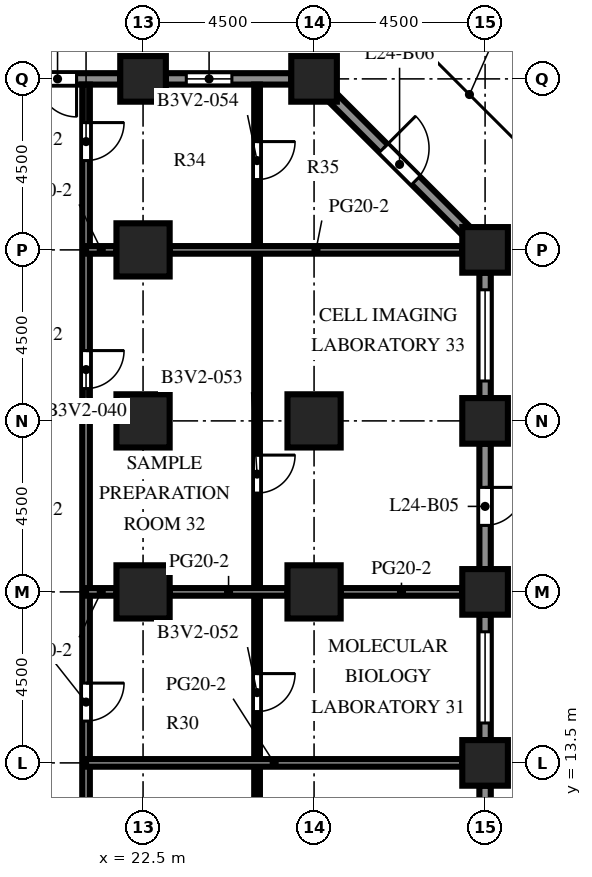
"""IFC4 building model, lengths in metres.
Left out: names, types, materials, properties, quantities, classifications, styles, units other than length and angle.
Written with IfcOpenShell. Run it as: python <this file> out.ifc"""

import sys

from ifc_helpers import new_model, si_unit, direction, frame, frame_2d, origin, origin_2d, place, context, subcontext, project, spatial, rectangle, extrude, element, fill, save


model = new_model("IFC4")
c1 = context("Model", 3, precision=1e-05, world=origin(), true_north=direction((0.0, 1.0)))
c2 = subcontext(c1, "Body", "Model", "MODEL_VIEW")
j1 = project(units=[si_unit("LENGTHUNIT", "METRE"), si_unit("PLANEANGLEUNIT", "RADIAN")], contexts=[c1])
p1 = place(None, origin())
s1 = spatial("IfcSite", under=j1, at=p1, CompositionType="ELEMENT")
p2 = place(p1, origin())
s2 = spatial("IfcBuilding", under=s1, at=p2, CompositionType="ELEMENT")
p3 = place(p2, frame((0.0, 0.0, 106.6)))
s3 = spatial("IfcBuildingStorey", under=s2, at=p3, CompositionType="ELEMENT", Elevation=106.6)
for number, where, z_axis, x_axis in (
    (1, (22.5, 31.5, 0.0), (0.0, 0.0, 1.0), (1.0, 0.0, 0.0)),
    (2, (27.0, 31.5, 0.0), (0.0, 0.0, 1.0), (1.0, 0.0, 0.0)),
    (3, (31.5, 13.5, 0.0), (0.0, 0.0, 1.0), (1.0, 0.0, 0.0)),
    (4, (31.5, 18.0, 0.0), (0.0, 0.0, 1.0), (1.0, 0.0, 0.0)),
    (5, (31.5, 22.5, 0.0), (0.0, 0.0, 1.0), (1.0, 0.0, 0.0)),
    (6, (31.5, 27.0, 0.0), (0.0, 0.0, 1.0), (1.0, 0.0, 0.0)),
):
    element("IfcColumn", number, at=place(p3, frame(where, z_axis=z_axis, x_axis=x_axis)), inside=s3, PredefinedType="COLUMN", context=c2, shape_type="SweptSolid", body=[
        extrude(rectangle(XDim=1.2, YDim=1.2, at=origin_2d()), origin(), (0.0, 0.0, 1.0), 4.1),
    ])
for number, where, z_axis, x_axis in (
    (7, (22.5, 18.0, 0.0), (0.0, 0.0, 1.0), (1.0, 0.0, 0.0)),
    (8, (22.5, 22.5, 0.0), (0.0, 0.0, 1.0), (1.0, 0.0, 0.0)),
    (9, (22.5, 27.0, 0.0), (0.0, 0.0, 1.0), (1.0, 0.0, 0.0)),
    (10, (27.0, 18.0, 0.0), (0.0, 0.0, 1.0), (1.0, 0.0, 0.0)),
    (11, (27.0, 22.5, 0.0), (0.0, 0.0, 1.0), (1.0, 0.0, 0.0)),
):
    element("IfcColumn", number, at=place(p3, frame(where, z_axis=z_axis, x_axis=x_axis)), inside=s3, PredefinedType="COLUMN", context=c2, shape_type="SweptSolid", body=[
        extrude(rectangle(XDim=1.4, YDim=1.4, at=origin_2d()), origin(), (0.0, 0.0, 1.0), 4.1),
    ])
p4 = place(p3, frame((31.5, 12.9, 0.0), z_axis=(0.0, 0.0, 1.0), x_axis=(0.0, -1.0, 0.0)))
e12 = element("IfcWall", 12, at=p4, inside=s3, PredefinedType="SOLIDWALL", context=c2, shape_type="SweptSolid", body=[
    extrude(rectangle(XDim=3.3, YDim=0.3, at=frame_2d((1.65, 0.0))), origin(), (0.0, 0.0, 1.0), 2.6),
])
p5 = place(p4, frame((0.45, 0.0, 0.8)))
e13 = element("IfcOpeningElement", 13, at=p5, cuts=e12, PredefinedType="OPENING", context=c2, shape_type="SweptSolid", body=[
    extrude(rectangle(XDim=2.4, YDim=1.7, at=frame_2d((1.2, 0.85))), frame((0.0, 0.16, 0.0), z_axis=(0.0, -1.0, 0.0), x_axis=(1.0, 0.0, 0.0)), (0.0, 0.0, 1.0), 0.32),
])
p6 = place(p3, frame((31.5, 17.4, 0.0), z_axis=(0.0, 0.0, 1.0), x_axis=(0.0, -1.0, 0.0)))
e14 = element("IfcWall", 14, at=p6, inside=s3, PredefinedType="SOLIDWALL", context=c2, shape_type="SweptSolid", body=[
    extrude(rectangle(XDim=3.3, YDim=0.3, at=frame_2d((1.65, 0.0))), origin(), (0.0, 0.0, 1.0), 2.6),
])
p7 = place(p6, frame((0.45, 0.0, 0.8)))
e15 = element("IfcOpeningElement", 15, at=p7, cuts=e14, PredefinedType="OPENING", context=c2, shape_type="SweptSolid", body=[
    extrude(rectangle(XDim=2.4, YDim=1.7, at=frame_2d((1.2, 0.85))), frame((0.0, 0.16, 0.0), z_axis=(0.0, -1.0, 0.0), x_axis=(1.0, 0.0, 0.0)), (0.0, 0.0, 1.0), 0.32),
])
p8 = place(p3, frame((31.5, 21.9, 0.0), z_axis=(0.0, 0.0, 1.0), x_axis=(0.0, -1.0, 0.0)))
e16 = element("IfcWall", 16, at=p8, inside=s3, PredefinedType="SOLIDWALL", context=c2, shape_type="SweptSolid", body=[
    extrude(rectangle(XDim=3.3, YDim=0.3, at=frame_2d((1.65, 0.0))), origin(), (0.0, 0.0, 1.0), 2.6),
])
p9 = place(p8, frame((1.15, 0.0, 0.0)))
e17 = element("IfcOpeningElement", 17, at=p9, cuts=e16, PredefinedType="OPENING", context=c2, shape_type="SweptSolid", body=[
    extrude(rectangle(XDim=1.0, YDim=2.2, at=frame_2d((0.5, 1.1))), frame((0.0, 0.16, 0.0), z_axis=(0.0, -1.0, 0.0), x_axis=(1.0, 0.0, 0.0)), (0.0, 0.0, 1.0), 0.32),
])
p10 = place(p3, frame((31.5, 26.4, 0.0), z_axis=(0.0, 0.0, 1.0), x_axis=(0.0, -1.0, 0.0)))
e18 = element("IfcWall", 18, at=p10, inside=s3, PredefinedType="SOLIDWALL", context=c2, shape_type="SweptSolid", body=[
    extrude(rectangle(XDim=3.3, YDim=0.3, at=frame_2d((1.65, 0.0))), origin(), (0.0, 0.0, 1.0), 2.6),
])
p11 = place(p10, frame((0.45, 0.0, 0.8)))
e19 = element("IfcOpeningElement", 19, at=p11, cuts=e18, PredefinedType="OPENING", context=c2, shape_type="SweptSolid", body=[
    extrude(rectangle(XDim=2.4, YDim=1.7, at=frame_2d((1.2, 0.85))), frame((0.0, 0.16, 0.0), z_axis=(0.0, -1.0, 0.0), x_axis=(1.0, 0.0, 0.0)), (0.0, 0.0, 1.0), 0.32),
])
p12 = place(p3, frame((27.494, 31.006, 0.0), z_axis=(0.0, 0.0, 1.0), x_axis=(0.707106781187, -0.707106781187, 0.0)))
e20 = element("IfcWall", 20, at=p12, inside=s3, PredefinedType="SOLIDWALL", context=c2, shape_type="SweptSolid", body=[
    extrude(rectangle(XDim=4.967, YDim=0.3, at=frame_2d((2.483, 0.0))), origin(), (0.0, 0.0, 1.0), 2.6),
])
p13 = place(p12, frame((1.884, 0.0, 0.0)))
e21 = element("IfcOpeningElement", 21, at=p13, cuts=e20, PredefinedType="OPENING", context=c2, shape_type="SweptSolid", body=[
    extrude(rectangle(XDim=1.2, YDim=2.2, at=frame_2d((0.6, 1.1))), frame((0.0, 0.16, 0.0), z_axis=(0.0, -1.0, 0.0), x_axis=(1.0, 0.0, 0.0)), (0.0, 0.0, 1.0), 0.32),
])
p14 = place(p3, frame((23.1, 31.5, 0.0), z_axis=(0.0, 0.0, 1.0), x_axis=(1.0, 0.0, 0.0)))
e22 = element("IfcWall", 22, at=p14, inside=s3, PredefinedType="SOLIDWALL", context=c2, shape_type="SweptSolid", body=[
    extrude(rectangle(XDim=3.3, YDim=0.3, at=frame_2d((1.65, 0.0))), origin(), (0.0, 0.0, 1.0), 2.6),
])
p15 = place(p14, frame((0.538, 0.0, 0.8)))
e23 = element("IfcOpeningElement", 23, at=p15, cuts=e22, PredefinedType="OPENING", context=c2, shape_type="SweptSolid", body=[
    extrude(rectangle(XDim=1.2, YDim=1.7, at=frame_2d((0.6, 0.85))), frame((0.0, 0.16, 0.0), z_axis=(0.0, -1.0, 0.0), x_axis=(1.0, 0.0, 0.0)), (0.0, 0.0, 1.0), 0.32),
])
p16 = place(p3, frame((18.6, 31.5, 0.0), z_axis=(0.0, 0.0, 1.0), x_axis=(1.0, 0.0, 0.0)))
e24 = element("IfcWall", 24, at=p16, inside=s3, PredefinedType="SOLIDWALL", context=c2, shape_type="SweptSolid", body=[
    extrude(rectangle(XDim=3.3, YDim=0.3, at=frame_2d((1.65, 0.0))), origin(), (0.0, 0.0, 1.0), 2.6),
])
p17 = place(p16, frame((1.15, 0.0, 0.0)))
e25 = element("IfcOpeningElement", 25, at=p17, cuts=e24, PredefinedType="OPENING", context=c2, shape_type="SweptSolid", body=[
    extrude(rectangle(XDim=1.0, YDim=2.2, at=frame_2d((0.5, 1.1))), frame((0.0, 0.16, 0.0), z_axis=(0.0, -1.0, 0.0), x_axis=(1.0, 0.0, 0.0)), (0.0, 0.0, 1.0), 0.32),
])
p18 = place(p3, frame((21.0, 31.35, 0.0), z_axis=(0.0, 0.0, 1.0), x_axis=(0.0, -1.0, 0.0)))
e26 = element("IfcWall", 26, at=p18, inside=s3, PredefinedType="PARTITIONING", context=c2, shape_type="SweptSolid", body=[
    extrude(rectangle(XDim=53.7, YDim=0.2, at=frame_2d((26.85, 0.0))), origin(), (0.0, 0.0, 1.0), 3.5),
])
p19 = place(p18, frame((50.5, 0.0, 0.0)))
e27 = element("IfcOpeningElement", 27, at=p19, cuts=e26, PredefinedType="OPENING", context=c2, shape_type="SweptSolid", body=[
    extrude(rectangle(XDim=1.0, YDim=2.1, at=frame_2d((0.5, 1.05))), frame((0.0, 0.11, 0.0), z_axis=(0.0, -1.0, 0.0), x_axis=(1.0, 0.0, 0.0)), (0.0, 0.0, 1.0), 0.22),
])
p20 = place(p18, frame((46.5, 0.0, 0.0)))
e28 = element("IfcOpeningElement", 28, at=p20, cuts=e26, PredefinedType="OPENING", context=c2, shape_type="SweptSolid", body=[
    extrude(rectangle(XDim=1.0, YDim=2.1, at=frame_2d((0.5, 1.05))), frame((0.0, 0.11, 0.0), z_axis=(0.0, -1.0, 0.0), x_axis=(1.0, 0.0, 0.0)), (0.0, 0.0, 1.0), 0.22),
])
p21 = place(p18, frame((38.5, 0.0, 0.0)))
e29 = element("IfcOpeningElement", 29, at=p21, cuts=e26, PredefinedType="OPENING", context=c2, shape_type="SweptSolid", body=[
    extrude(rectangle(XDim=1.0, YDim=2.1, at=frame_2d((0.5, 1.05))), frame((0.0, 0.11, 0.0), z_axis=(0.0, -1.0, 0.0), x_axis=(1.0, 0.0, 0.0)), (0.0, 0.0, 1.0), 0.22),
])
p22 = place(p18, frame((33.0, 0.0, 0.0)))
e30 = element("IfcOpeningElement", 30, at=p22, cuts=e26, PredefinedType="OPENING", context=c2, shape_type="SweptSolid", body=[
    extrude(rectangle(XDim=1.0, YDim=2.1, at=frame_2d((0.5, 1.05))), frame((0.0, 0.11, 0.0), z_axis=(0.0, -1.0, 0.0), x_axis=(1.0, 0.0, 0.0)), (0.0, 0.0, 1.0), 0.22),
])
p23 = place(p18, frame((23.5, 0.0, 0.0)))
e31 = element("IfcOpeningElement", 31, at=p23, cuts=e26, PredefinedType="OPENING", context=c2, shape_type="SweptSolid", body=[
    extrude(rectangle(XDim=1.0, YDim=2.1, at=frame_2d((0.5, 1.05))), frame((0.0, 0.11, 0.0), z_axis=(0.0, -1.0, 0.0), x_axis=(1.0, 0.0, 0.0)), (0.0, 0.0, 1.0), 0.22),
])
p24 = place(p18, frame((15.75, 0.0, 0.0)))
e32 = element("IfcOpeningElement", 32, at=p24, cuts=e26, PredefinedType="OPENING", context=c2, shape_type="SweptSolid", body=[
    extrude(rectangle(XDim=1.0, YDim=2.1, at=frame_2d((0.5, 1.05))), frame((0.0, 0.11, 0.0), z_axis=(0.0, -1.0, 0.0), x_axis=(1.0, 0.0, 0.0)), (0.0, 0.0, 1.0), 0.22),
])
p25 = place(p18, frame((7.0, 0.0, 0.0)))
e33 = element("IfcOpeningElement", 33, at=p25, cuts=e26, PredefinedType="OPENING", context=c2, shape_type="SweptSolid", body=[
    extrude(rectangle(XDim=1.0, YDim=2.1, at=frame_2d((0.5, 1.05))), frame((0.0, 0.11, 0.0), z_axis=(0.0, -1.0, 0.0), x_axis=(1.0, 0.0, 0.0)), (0.0, 0.0, 1.0), 0.22),
])
p26 = place(p18, frame((1.0, 0.0, 0.0)))
e34 = element("IfcOpeningElement", 34, at=p26, cuts=e26, PredefinedType="OPENING", context=c2, shape_type="SweptSolid", body=[
    extrude(rectangle(XDim=1.0, YDim=2.1, at=frame_2d((0.5, 1.05))), frame((0.0, 0.11, 0.0), z_axis=(0.0, -1.0, 0.0), x_axis=(1.0, 0.0, 0.0)), (0.0, 0.0, 1.0), 0.22),
])
p27 = place(p3, frame((25.5, 31.35, 0.0), z_axis=(0.0, 0.0, 1.0), x_axis=(0.0, -1.0, 0.0)))
e35 = element("IfcWall", 35, at=p27, inside=s3, PredefinedType="PARTITIONING", context=c2, shape_type="SweptSolid", body=[
    extrude(rectangle(XDim=53.7, YDim=0.15, at=frame_2d((26.85, 0.0))), origin(), (0.0, 0.0, 1.0), 3.5),
])
p28 = place(p27, frame((50.5, 0.0, 0.0)))
e36 = element("IfcOpeningElement", 36, at=p28, cuts=e35, PredefinedType="OPENING", context=c2, shape_type="SweptSolid", body=[
    extrude(rectangle(XDim=1.0, YDim=2.1, at=frame_2d((0.5, 1.05))), frame((0.0, 0.085, 0.0), z_axis=(0.0, -1.0, 0.0), x_axis=(1.0, 0.0, 0.0)), (0.0, 0.0, 1.0), 0.17),
])
p29 = place(p27, frame((46.25, 0.0, 0.0)))
e37 = element("IfcOpeningElement", 37, at=p29, cuts=e35, PredefinedType="OPENING", context=c2, shape_type="SweptSolid", body=[
    extrude(rectangle(XDim=1.0, YDim=2.1, at=frame_2d((0.5, 1.05))), frame((0.0, 0.085, 0.0), z_axis=(0.0, -1.0, 0.0), x_axis=(1.0, 0.0, 0.0)), (0.0, 0.0, 1.0), 0.17),
])
p30 = place(p27, frame((38.5, 0.0, 0.0)))
e38 = element("IfcOpeningElement", 38, at=p30, cuts=e35, PredefinedType="OPENING", context=c2, shape_type="SweptSolid", body=[
    extrude(rectangle(XDim=1.0, YDim=2.1, at=frame_2d((0.5, 1.05))), frame((0.0, 0.085, 0.0), z_axis=(0.0, -1.0, 0.0), x_axis=(1.0, 0.0, 0.0)), (0.0, 0.0, 1.0), 0.17),
])
p31 = place(p27, frame((33.0, 0.0, 0.0)))
e39 = element("IfcOpeningElement", 39, at=p31, cuts=e35, PredefinedType="OPENING", context=c2, shape_type="SweptSolid", body=[
    extrude(rectangle(XDim=1.0, YDim=2.1, at=frame_2d((0.5, 1.05))), frame((0.0, 0.085, 0.0), z_axis=(0.0, -1.0, 0.0), x_axis=(1.0, 0.0, 0.0)), (0.0, 0.0, 1.0), 0.17),
])
p32 = place(p27, frame((24.75, 0.0, 0.0)))
e40 = element("IfcOpeningElement", 40, at=p32, cuts=e35, PredefinedType="OPENING", context=c2, shape_type="SweptSolid", body=[
    extrude(rectangle(XDim=1.0, YDim=2.1, at=frame_2d((0.5, 1.05))), frame((0.0, 0.085, 0.0), z_axis=(0.0, -1.0, 0.0), x_axis=(1.0, 0.0, 0.0)), (0.0, 0.0, 1.0), 0.17),
])
p33 = place(p27, frame((15.5, 0.0, 0.0)))
e41 = element("IfcOpeningElement", 41, at=p33, cuts=e35, PredefinedType="OPENING", context=c2, shape_type="SweptSolid", body=[
    extrude(rectangle(XDim=1.0, YDim=2.1, at=frame_2d((0.5, 1.05))), frame((0.0, 0.085, 0.0), z_axis=(0.0, -1.0, 0.0), x_axis=(1.0, 0.0, 0.0)), (0.0, 0.0, 1.0), 0.17),
])
p34 = place(p27, frame((9.75, 0.0, 0.0)))
e42 = element("IfcOpeningElement", 42, at=p34, cuts=e35, PredefinedType="OPENING", context=c2, shape_type="SweptSolid", body=[
    extrude(rectangle(XDim=1.0, YDim=2.1, at=frame_2d((0.5, 1.05))), frame((0.0, 0.085, 0.0), z_axis=(0.0, -1.0, 0.0), x_axis=(1.0, 0.0, 0.0)), (0.0, 0.0, 1.0), 0.17),
])
p35 = place(p27, frame((1.5, 0.0, 0.0)))
e43 = element("IfcOpeningElement", 43, at=p35, cuts=e35, PredefinedType="OPENING", context=c2, shape_type="SweptSolid", body=[
    extrude(rectangle(XDim=1.0, YDim=2.1, at=frame_2d((0.5, 1.05))), frame((0.0, 0.085, 0.0), z_axis=(0.0, -1.0, 0.0), x_axis=(1.0, 0.0, 0.0)), (0.0, 0.0, 1.0), 0.17),
])
p36 = place(p3, frame((21.0, 13.5, 0.0), z_axis=(0.0, 0.0, 1.0), x_axis=(1.0, 0.0, 0.0)))
e44 = element("IfcWall", 44, at=p36, inside=s3, PredefinedType="PARTITIONING", context=c2, shape_type="SweptSolid", body=[
    extrude(rectangle(XDim=9.9, YDim=0.2, at=frame_2d((4.95, 0.0))), origin(), (0.0, 0.0, 1.0), 3.5),
])
p37 = place(p3, frame((21.0, 18.0, 0.0), z_axis=(0.0, 0.0, 1.0), x_axis=(1.0, 0.0, 0.0)))
e45 = element("IfcWall", 45, at=p37, inside=s3, PredefinedType="PARTITIONING", context=c2, shape_type="SweptSolid", body=[
    extrude(rectangle(XDim=0.8, YDim=0.2, at=frame_2d((0.4, 0.0))), origin(), (0.0, 0.0, 1.0), 3.5),
])
p38 = place(p3, frame((23.2, 18.0, 0.0), z_axis=(0.0, 0.0, 1.0), x_axis=(1.0, 0.0, 0.0)))
e46 = element("IfcWall", 46, at=p38, inside=s3, PredefinedType="PARTITIONING", context=c2, shape_type="SweptSolid", body=[
    extrude(rectangle(XDim=3.1, YDim=0.2, at=frame_2d((1.55, 0.0))), origin(), (0.0, 0.0, 1.0), 3.5),
])
p39 = place(p3, frame((27.7, 18.0, 0.0), z_axis=(0.0, 0.0, 1.0), x_axis=(1.0, 0.0, 0.0)))
e47 = element("IfcWall", 47, at=p39, inside=s3, PredefinedType="PARTITIONING", context=c2, shape_type="SweptSolid", body=[
    extrude(rectangle(XDim=3.2, YDim=0.2, at=frame_2d((1.6, 0.0))), origin(), (0.0, 0.0, 1.0), 3.5),
])
p40 = place(p3, frame((21.0, 27.0, 0.0), z_axis=(0.0, 0.0, 1.0), x_axis=(1.0, 0.0, 0.0)))
e48 = element("IfcWall", 48, at=p40, inside=s3, PredefinedType="PARTITIONING", context=c2, shape_type="SweptSolid", body=[
    extrude(rectangle(XDim=0.8, YDim=0.2, at=frame_2d((0.4, 0.0))), origin(), (0.0, 0.0, 1.0), 3.5),
])
p41 = place(p3, frame((23.2, 27.0, 0.0), z_axis=(0.0, 0.0, 1.0), x_axis=(1.0, 0.0, 0.0)))
e49 = element("IfcWall", 49, at=p41, inside=s3, PredefinedType="PARTITIONING", context=c2, shape_type="SweptSolid", body=[
    extrude(rectangle(XDim=7.7, YDim=0.2, at=frame_2d((3.85, 0.0))), origin(), (0.0, 0.0, 1.0), 3.5),
])
p42 = place(p7, origin())
e50 = element("IfcWindow", 50, at=p42, inside=s3, PartitioningType="SINGLE_PANEL", PredefinedType="WINDOW", context=c2, shape_type="SweptSolid", body=[
    extrude(rectangle(XDim=2.4, YDim=1.7, at=frame_2d((1.2, 0.85))), frame((0.0, 0.03, 0.0), z_axis=(0.0, -1.0, 0.0), x_axis=(1.0, 0.0, 0.0)), (0.0, 0.0, 1.0), 0.06),
])
fill(e15, e50)
p43 = place(p9, origin())
e51 = element("IfcDoor", 51, at=p43, inside=s3, OperationType="SINGLE_SWING_LEFT", PredefinedType="DOOR", context=c2, shape_type="SweptSolid", body=[
    extrude(rectangle(XDim=1.0, YDim=2.2, at=frame_2d((0.5, 1.1))), frame((0.0, 0.025, 0.0), z_axis=(0.0, -1.0, 0.0), x_axis=(1.0, 0.0, 0.0)), (0.0, 0.0, 1.0), 0.05),
])
fill(e17, e51)
p44 = place(p11, origin())
e52 = element("IfcWindow", 52, at=p44, inside=s3, PartitioningType="SINGLE_PANEL", PredefinedType="WINDOW", context=c2, shape_type="SweptSolid", body=[
    extrude(rectangle(XDim=2.4, YDim=1.7, at=frame_2d((1.2, 0.85))), frame((0.0, 0.03, 0.0), z_axis=(0.0, -1.0, 0.0), x_axis=(1.0, 0.0, 0.0)), (0.0, 0.0, 1.0), 0.06),
])
fill(e19, e52)
p45 = place(p13, origin())
e53 = element("IfcDoor", 53, at=p45, inside=s3, OperationType="SINGLE_SWING_LEFT", PredefinedType="DOOR", context=c2, shape_type="SweptSolid", body=[
    extrude(rectangle(XDim=1.2, YDim=2.2, at=frame_2d((0.6, 1.1))), frame((0.0, 0.025, 0.0), z_axis=(0.0, -1.0, 0.0), x_axis=(1.0, 0.0, 0.0)), (0.0, 0.0, 1.0), 0.05),
])
fill(e21, e53)
p46 = place(p15, origin())
e54 = element("IfcWindow", 54, at=p46, inside=s3, PartitioningType="SINGLE_PANEL", PredefinedType="WINDOW", context=c2, shape_type="SweptSolid", body=[
    extrude(rectangle(XDim=1.2, YDim=1.7, at=frame_2d((0.6, 0.85))), frame((0.0, 0.03, 0.0), z_axis=(0.0, -1.0, 0.0), x_axis=(1.0, 0.0, 0.0)), (0.0, 0.0, 1.0), 0.06),
])
fill(e23, e54)
p47 = place(p17, origin())
e55 = element("IfcDoor", 55, at=p47, inside=s3, OperationType="SINGLE_SWING_RIGHT", PredefinedType="DOOR", context=c2, shape_type="SweptSolid", body=[
    extrude(rectangle(XDim=1.0, YDim=2.2, at=frame_2d((0.5, 1.1))), frame((0.0, 0.025, 0.0), z_axis=(0.0, -1.0, 0.0), x_axis=(1.0, 0.0, 0.0)), (0.0, 0.0, 1.0), 0.05),
])
fill(e25, e55)
p48 = place(p24, origin())
e56 = element("IfcDoor", 56, at=p48, inside=s3, OperationType="SINGLE_SWING_LEFT", PredefinedType="DOOR", context=c2, shape_type="SweptSolid", body=[
    extrude(rectangle(XDim=1.0, YDim=2.1, at=frame_2d((0.5, 1.05))), frame((0.0, 0.025, 0.0), z_axis=(0.0, -1.0, 0.0), x_axis=(1.0, 0.0, 0.0)), (0.0, 0.0, 1.0), 0.05),
])
fill(e32, e56)
p49 = place(p25, origin())
e57 = element("IfcDoor", 57, at=p49, inside=s3, OperationType="SINGLE_SWING_LEFT", PredefinedType="DOOR", context=c2, shape_type="SweptSolid", body=[
    extrude(rectangle(XDim=1.0, YDim=2.1, at=frame_2d((0.5, 1.05))), frame((0.0, 0.025, 0.0), z_axis=(0.0, -1.0, 0.0), x_axis=(1.0, 0.0, 0.0)), (0.0, 0.0, 1.0), 0.05),
])
fill(e33, e57)
p50 = place(p26, origin())
e58 = element("IfcDoor", 58, at=p50, inside=s3, OperationType="SINGLE_SWING_LEFT", PredefinedType="DOOR", context=c2, shape_type="SweptSolid", body=[
    extrude(rectangle(XDim=1.0, YDim=2.1, at=frame_2d((0.5, 1.05))), frame((0.0, 0.025, 0.0), z_axis=(0.0, -1.0, 0.0), x_axis=(1.0, 0.0, 0.0)), (0.0, 0.0, 1.0), 0.05),
])
fill(e34, e58)
p51 = place(p33, origin())
e59 = element("IfcDoor", 59, at=p51, inside=s3, OperationType="SINGLE_SWING_LEFT", PredefinedType="DOOR", context=c2, shape_type="SweptSolid", body=[
    extrude(rectangle(XDim=1.0, YDim=2.1, at=frame_2d((0.5, 1.05))), frame((0.0, 0.025, 0.0), z_axis=(0.0, -1.0, 0.0), x_axis=(1.0, 0.0, 0.0)), (0.0, 0.0, 1.0), 0.05),
])
fill(e41, e59)
p52 = place(p34, origin())
e60 = element("IfcDoor", 60, at=p52, inside=s3, OperationType="SINGLE_SWING_LEFT", PredefinedType="DOOR", context=c2, shape_type="SweptSolid", body=[
    extrude(rectangle(XDim=1.0, YDim=2.1, at=frame_2d((0.5, 1.05))), frame((0.0, 0.025, 0.0), z_axis=(0.0, -1.0, 0.0), x_axis=(1.0, 0.0, 0.0)), (0.0, 0.0, 1.0), 0.05),
])
fill(e42, e60)
p53 = place(p35, origin())
e61 = element("IfcDoor", 61, at=p53, inside=s3, OperationType="SINGLE_SWING_LEFT", PredefinedType="DOOR", context=c2, shape_type="SweptSolid", body=[
    extrude(rectangle(XDim=1.0, YDim=2.1, at=frame_2d((0.5, 1.05))), frame((0.0, 0.025, 0.0), z_axis=(0.0, -1.0, 0.0), x_axis=(1.0, 0.0, 0.0)), (0.0, 0.0, 1.0), 0.05),
])
fill(e43, e61)
save(model, sys.argv[1])
